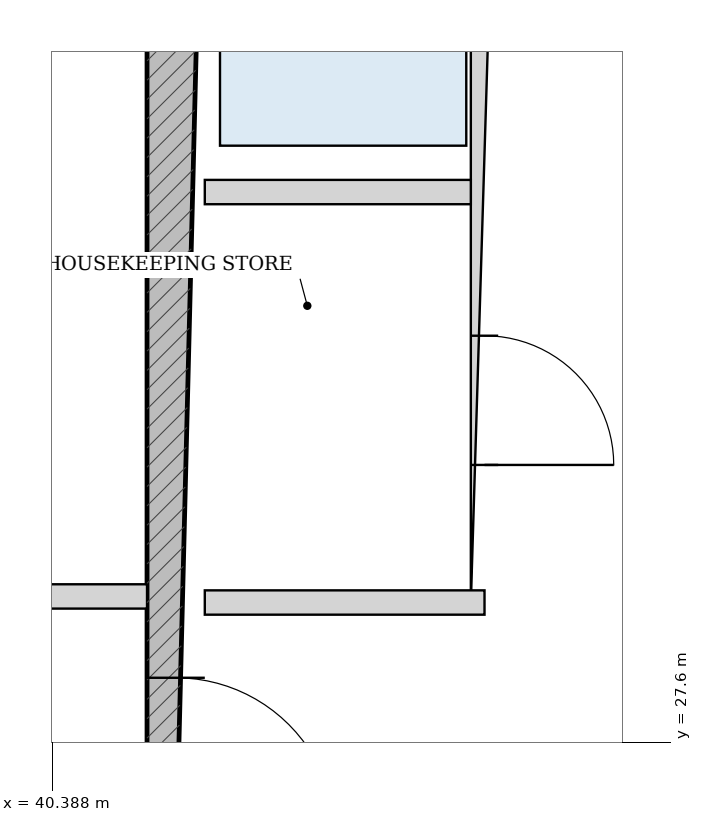
"""IFC4 building model, lengths in metres.
Left out: names, types, materials, properties, quantities, classifications, styles, units other than length and angle.
Written with IfcOpenShell. Run it as: python <this file> out.ifc"""

import sys

from ifc_helpers import new_model, si_unit, direction, frame, frame_2d, origin, place, context, subcontext, project, spatial, rectangle, extrude, source, transform, mapped, element, fill, save


model = new_model("IFC4")
c1 = context("Model", 3, precision=1e-05, world=origin(), true_north=direction((-0.2419218956, 0.970295726276)))
c2 = subcontext(c1, "Body", "Model", "MODEL_VIEW")
j1 = project(units=[si_unit("LENGTHUNIT", "METRE"), si_unit("PLANEANGLEUNIT", "RADIAN")], contexts=[c1])
p1 = place(None, origin())
s1 = spatial("IfcSite", under=j1, at=p1, CompositionType="ELEMENT")
p2 = place(p1, origin())
s2 = spatial("IfcBuilding", under=s1, at=p2, CompositionType="ELEMENT")
p3 = place(p2, frame((0.0, 0.0, 235.6)))
s3 = spatial("IfcBuildingStorey", under=s2, at=p3, CompositionType="ELEMENT", Elevation=235.6)
p4 = place(p3, frame((41.2, 19.175, 0.0), z_axis=(0.0, 0.0, 1.0), x_axis=(0.0, 1.0, 0.0)))
e1 = element("IfcWall", 1, at=p4, inside=s3, PredefinedType="SHEAR", context=c2, shape_type="SweptSolid", body=[
    extrude(rectangle(XDim=15.25, YDim=0.38, at=frame_2d((7.625, 0.0))), origin(), (0.0, 0.0, 1.0), 3.435),
])
p5 = place(p4, frame((7.8, 0.0, 0.0)))
e2 = element("IfcOpeningElement", 2, at=p5, cuts=e1, PredefinedType="OPENING", context=c2, shape_type="SweptSolid", body=[
    extrude(rectangle(XDim=1.05, YDim=2.15, at=frame_2d((0.525, 1.075))), frame((0.0, 0.2, 0.0), z_axis=(0.0, -1.0, 0.0), x_axis=(1.0, 0.0, 0.0)), (0.0, 0.0, 1.0), 0.4),
])
p6 = place(p3, frame((43.23, 28.52, 0.0), z_axis=(0.0, 0.0, 1.0), x_axis=(0.0, 1.0, 0.0)))
e3 = element("IfcWall", 3, at=p6, inside=s3, PredefinedType="PARTITIONING", context=c2, shape_type="SweptSolid", body=[
    extrude(rectangle(XDim=5.905, YDim=0.18, at=frame_2d((2.953, 0.0))), origin(), (0.0, 0.0, 1.0), 3.435),
])
p7 = place(p6, frame((0.905, 0.0, 0.0)))
e4 = element("IfcOpeningElement", 4, at=p7, cuts=e3, PredefinedType="OPENING", context=c2, shape_type="SweptSolid", body=[
    extrude(rectangle(XDim=0.85, YDim=2.1, at=frame_2d((0.425, 1.05))), frame((0.0, 0.1, 0.0), z_axis=(0.0, -1.0, 0.0), x_axis=(1.0, 0.0, 0.0)), (0.0, 0.0, 1.0), 0.2),
])
p8 = place(p6, frame((3.655, 0.0, 0.0)))
e5 = element("IfcOpeningElement", 5, at=p8, cuts=e3, PredefinedType="OPENING", context=c2, shape_type="SweptSolid", body=[
    extrude(rectangle(XDim=1.15, YDim=2.2, at=frame_2d((0.575, 1.1))), frame((0.0, 0.1, 0.0), z_axis=(0.0, -1.0, 0.0), x_axis=(1.0, 0.0, 0.0)), (0.0, 0.0, 1.0), 0.2),
])
p9 = place(p3, frame((41.39, 31.22, 0.0), z_axis=(0.0, 0.0, 1.0), x_axis=(1.0, 0.0, 0.0)))
e6 = element("IfcWall", 6, at=p9, inside=s3, PredefinedType="PARTITIONING", context=c2, shape_type="SweptSolid", body=[
    extrude(rectangle(XDim=1.75, YDim=0.16, at=frame_2d((0.875, 0.0))), origin(), (0.0, 0.0, 1.0), 3.435),
])
p10 = place(p3, frame((41.39, 28.52, 0.0), z_axis=(0.0, 0.0, 1.0), x_axis=(1.0, 0.0, 0.0)))
e7 = element("IfcWall", 7, at=p10, inside=s3, PredefinedType="PARTITIONING", context=c2, shape_type="SweptSolid", body=[
    extrude(rectangle(XDim=1.84, YDim=0.16, at=frame_2d((0.92, 0.0))), origin(), (0.0, 0.0, 1.0), 3.435),
])
p11 = place(p3, frame((34.99, 28.56, 0.0), z_axis=(0.0, 0.0, 1.0), x_axis=(1.0, 0.0, 0.0)))
e8 = element("IfcWall", 8, at=p11, inside=s3, PredefinedType="PARTITIONING", context=c2, shape_type="SweptSolid", body=[
    extrude(rectangle(XDim=6.02, YDim=0.16, at=frame_2d((3.01, 0.0))), origin(), (0.0, 0.0, 1.0), 3.435),
])
p12 = place(p11, frame((1.025, 0.0, 0.0)))
e9 = element("IfcOpeningElement", 9, at=p12, cuts=e8, PredefinedType="OPENING", context=c2, shape_type="SweptSolid", body=[
    extrude(rectangle(XDim=0.86, YDim=2.1, at=frame_2d((0.43, 1.05))), frame((0.0, 0.09, 0.0), z_axis=(0.0, -1.0, 0.0), x_axis=(1.0, 0.0, 0.0)), (0.0, 0.0, 1.0), 0.18),
])
p13 = place(p11, frame((4.14, 0.0, 0.0)))
e10 = element("IfcOpeningElement", 10, at=p13, cuts=e8, PredefinedType="OPENING", context=c2, shape_type="SweptSolid", body=[
    extrude(rectangle(XDim=0.85, YDim=2.1, at=frame_2d((0.425, 1.05))), frame((0.0, 0.09, 0.0), z_axis=(0.0, -1.0, 0.0), x_axis=(1.0, 0.0, 0.0)), (0.0, 0.0, 1.0), 0.18),
])
m1 = source(origin(), c2, "Body", "SweptSolid", [
    extrude(rectangle(XDim=1.05, YDim=2.15, at=frame_2d((0.525, 1.075))), frame((0.0, 0.025, 0.0), z_axis=(0.0, -1.0, 0.0), x_axis=(1.0, 0.0, 0.0)), (0.0, 0.0, 1.0), 0.05),
])
p14 = place(p5, frame((1.05, 0.0, 0.0), z_axis=(0.0, 0.0, 1.0), x_axis=(-1.0, 0.0, 0.0)))
e11 = element("IfcDoor", 11, at=p14, inside=s3, OperationType="SINGLE_SWING_RIGHT", PredefinedType="DOOR", context=c2, shape_type="MappedRepresentation", body=[
    mapped(m1, transform((0.0, 0.0, 0.0), scale=1.0)),
])
fill(e2, e11)
m2 = source(origin(), c2, "Body", "SweptSolid", [
    extrude(rectangle(XDim=0.85, YDim=2.1, at=frame_2d((0.425, 1.05))), frame((0.0, 0.025, 0.0), z_axis=(0.0, -1.0, 0.0), x_axis=(1.0, 0.0, 0.0)), (0.0, 0.0, 1.0), 0.05),
])
p15 = place(p7, frame((0.85, 0.0, 0.0), z_axis=(0.0, 0.0, 1.0), x_axis=(-1.0, 0.0, 0.0)))
e12 = element("IfcDoor", 12, at=p15, inside=s3, OperationType="SINGLE_SWING_RIGHT", PredefinedType="DOOR", context=c2, shape_type="MappedRepresentation", body=[
    mapped(m2, transform((0.0, 0.0, 0.0), scale=1.0)),
])
fill(e4, e12)
save(model, sys.argv[1])
